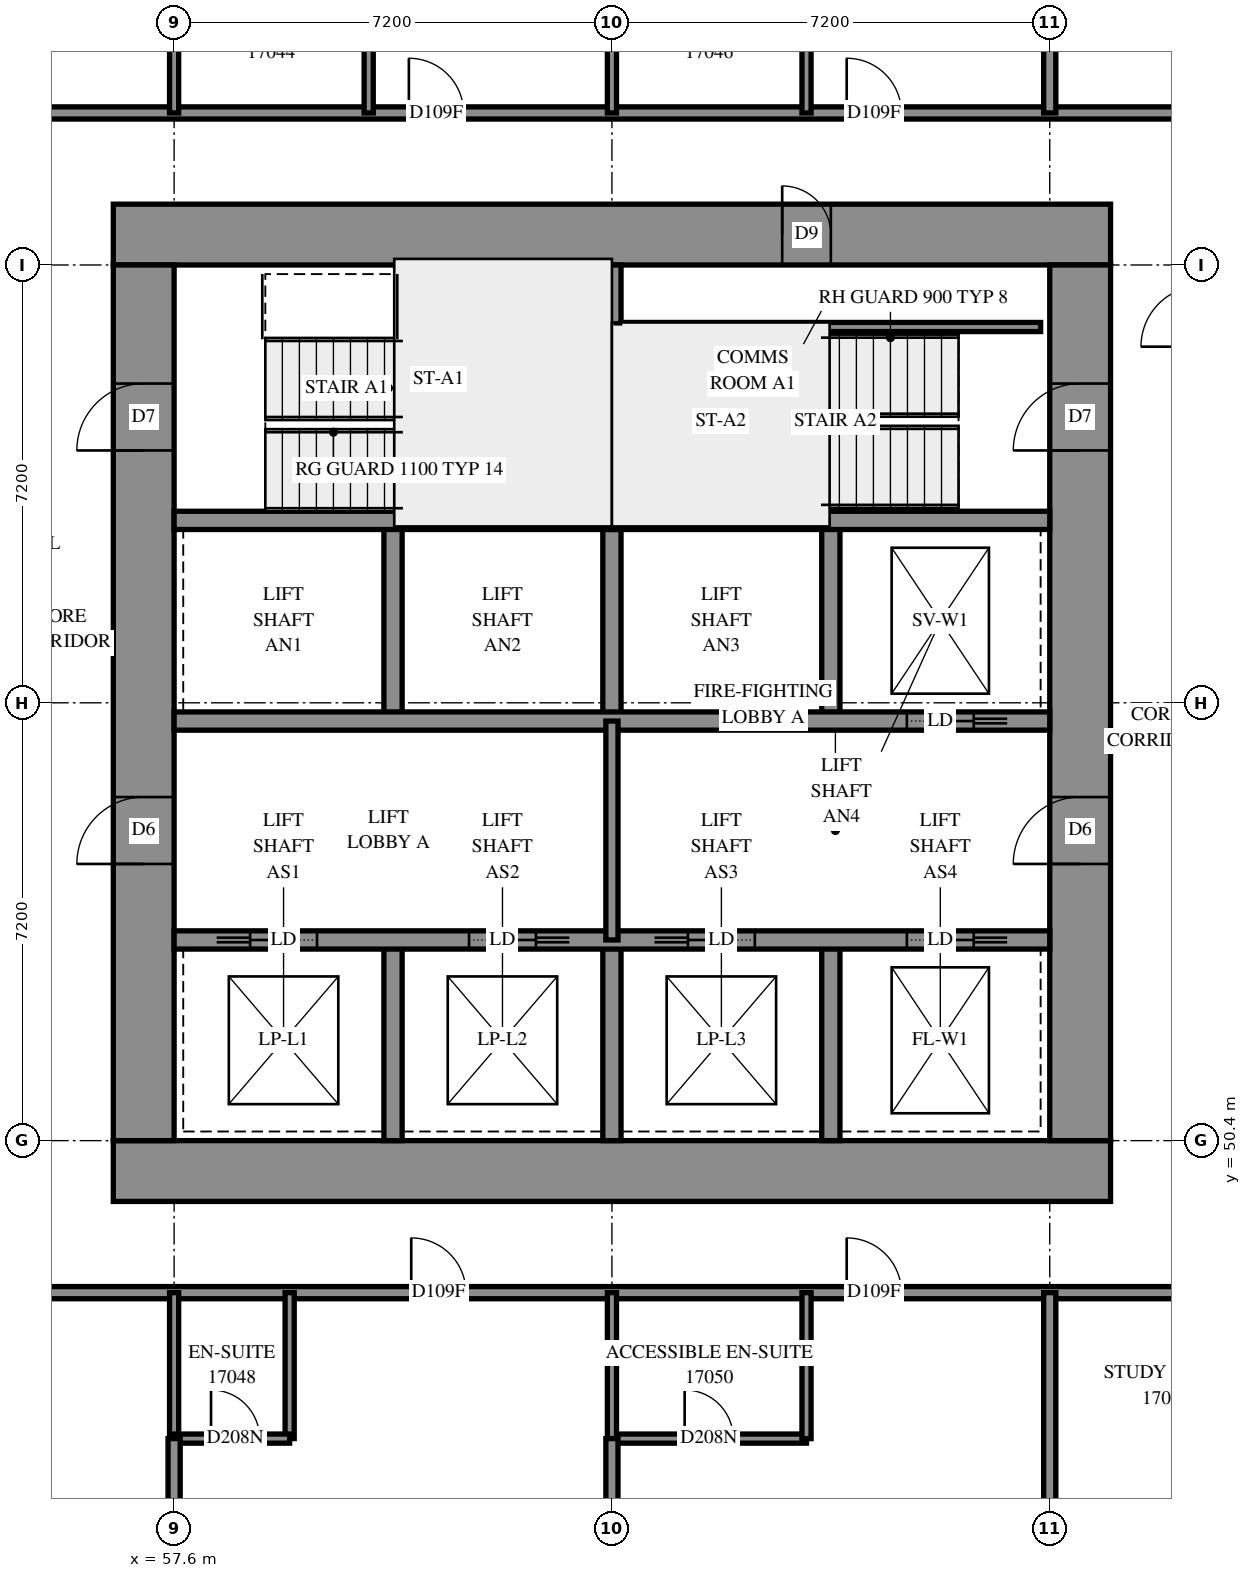
"""IFC4 building model, lengths in metres.
Left out: names, types, materials, properties, quantities, classifications, styles, units other than length and angle.
Written with IfcOpenShell. Run it as: python <this file> out.ifc"""

import sys

from ifc_helpers import new_model, si_unit, direction, frame, frame_2d, origin, place, context, subcontext, project, spatial, rectangle, extrude, element, fill, save


model = new_model("IFC4")
c1 = context("Model", 3, precision=1e-05, world=origin(), true_north=direction((0.0, 1.0)))
c2 = subcontext(c1, "Body", "Model", "MODEL_VIEW")
j1 = project(units=[si_unit("LENGTHUNIT", "METRE"), si_unit("PLANEANGLEUNIT", "RADIAN")], contexts=[c1])
p1 = place(None, origin())
s1 = spatial("IfcSite", under=j1, at=p1, CompositionType="ELEMENT")
p2 = place(p1, origin())
s2 = spatial("IfcBuilding", under=s1, at=p2, CompositionType="ELEMENT")
p3 = place(p2, frame((0.0, 0.0, 64.4)))
s3 = spatial("IfcBuildingStorey", under=s2, at=p3, CompositionType="ELEMENT", Elevation=64.4)
p4 = place(p3, frame((56.6, 49.9, -0.3), z_axis=(0.0, 0.0, 1.0), x_axis=(1.0, 0.0, 0.0)))
e1 = element("IfcWall", 1, at=p4, inside=s3, PredefinedType="SHEAR", context=c2, shape_type="SweptSolid", body=[
    extrude(rectangle(XDim=16.4, YDim=1.0, at=frame_2d((8.2, 0.0))), origin(), (0.0, 0.0, 1.0), 2.7),
])
p5 = place(p3, frame((56.6, 65.3, -0.3), z_axis=(0.0, 0.0, 1.0), x_axis=(1.0, 0.0, 0.0)))
e2 = element("IfcWall", 2, at=p5, inside=s3, PredefinedType="SHEAR", context=c2, shape_type="SweptSolid", body=[
    extrude(rectangle(XDim=16.4, YDim=1.0, at=frame_2d((8.2, 0.0))), origin(), (0.0, 0.0, 1.0), 2.7),
])
p6 = place(p5, frame((11.0, 0.0, 0.3)))
e3 = element("IfcOpeningElement", 3, at=p6, cuts=e2, PredefinedType="OPENING", context=c2, shape_type="SweptSolid", body=[
    extrude(rectangle(XDim=0.8, YDim=2.1, at=frame_2d((0.4, 1.05))), frame((0.0, 0.51, 0.0), z_axis=(0.0, -1.0, 0.0), x_axis=(1.0, 0.0, 0.0)), (0.0, 0.0, 1.0), 1.02),
])
p7 = place(p3, frame((57.1, 50.4, -0.3), z_axis=(0.0, 0.0, 1.0), x_axis=(0.0, 1.0, 0.0)))
e4 = element("IfcWall", 4, at=p7, inside=s3, PredefinedType="SHEAR", context=c2, shape_type="SweptSolid", body=[
    extrude(rectangle(XDim=14.4, YDim=1.0, at=frame_2d((7.2, 0.0))), origin(), (0.0, 0.0, 1.0), 2.7),
])
p8 = place(p7, frame((4.55, 0.0, 0.3)))
e5 = element("IfcOpeningElement", 5, at=p8, cuts=e4, PredefinedType="OPENING", context=c2, shape_type="SweptSolid", body=[
    extrude(rectangle(XDim=1.1, YDim=2.1, at=frame_2d((0.55, 1.05))), frame((0.0, 0.51, 0.0), z_axis=(0.0, -1.0, 0.0), x_axis=(1.0, 0.0, 0.0)), (0.0, 0.0, 1.0), 1.02),
])
p9 = place(p7, frame((11.35, 0.0, 0.3)))
e6 = element("IfcOpeningElement", 6, at=p9, cuts=e4, PredefinedType="OPENING", context=c2, shape_type="SweptSolid", body=[
    extrude(rectangle(XDim=1.1, YDim=2.1, at=frame_2d((0.55, 1.05))), frame((0.0, 0.51, 0.0), z_axis=(0.0, -1.0, 0.0), x_axis=(1.0, 0.0, 0.0)), (0.0, 0.0, 1.0), 1.02),
])
p10 = place(p3, frame((72.5, 50.4, -0.3), z_axis=(0.0, 0.0, 1.0), x_axis=(0.0, 1.0, 0.0)))
e7 = element("IfcWall", 7, at=p10, inside=s3, PredefinedType="SHEAR", context=c2, shape_type="SweptSolid", body=[
    extrude(rectangle(XDim=14.4, YDim=1.0, at=frame_2d((7.2, 0.0))), origin(), (0.0, 0.0, 1.0), 2.7),
])
p11 = place(p10, frame((4.55, 0.0, 0.3)))
e8 = element("IfcOpeningElement", 8, at=p11, cuts=e7, PredefinedType="OPENING", context=c2, shape_type="SweptSolid", body=[
    extrude(rectangle(XDim=1.1, YDim=2.1, at=frame_2d((0.55, 1.05))), frame((0.0, 0.51, 0.0), z_axis=(0.0, -1.0, 0.0), x_axis=(1.0, 0.0, 0.0)), (0.0, 0.0, 1.0), 1.02),
])
p12 = place(p10, frame((11.35, 0.0, 0.3)))
e9 = element("IfcOpeningElement", 9, at=p12, cuts=e7, PredefinedType="OPENING", context=c2, shape_type="SweptSolid", body=[
    extrude(rectangle(XDim=1.1, YDim=2.1, at=frame_2d((0.55, 1.05))), frame((0.0, 0.51, 0.0), z_axis=(0.0, -1.0, 0.0), x_axis=(1.0, 0.0, 0.0)), (0.0, 0.0, 1.0), 1.02),
])
for number, where, z_axis, x_axis in (
    (10, (61.2, 50.4, 0.0), (0.0, 0.0, 1.0), (0.0, 1.0, 0.0)),
    (11, (61.2, 57.3, 0.0), (0.0, 0.0, 1.0), (0.0, 1.0, 0.0)),
    (12, (64.8, 50.4, 0.0), (0.0, 0.0, 1.0), (0.0, 1.0, 0.0)),
    (13, (64.8, 57.3, 0.0), (0.0, 0.0, 1.0), (0.0, 1.0, 0.0)),
    (14, (68.4, 50.4, 0.0), (0.0, 0.0, 1.0), (0.0, 1.0, 0.0)),
    (15, (68.4, 57.3, 0.0), (0.0, 0.0, 1.0), (0.0, 1.0, 0.0)),
):
    element("IfcWall", number, at=place(p3, frame(where, z_axis=z_axis, x_axis=x_axis)), inside=s3, PredefinedType="SOLIDWALL", context=c2, shape_type="SweptSolid", body=[
        extrude(rectangle(XDim=3.3, YDim=0.3, at=frame_2d((1.65, 0.0))), origin(), (0.0, 0.0, 1.0), 3.1),
    ])
p13 = place(p3, frame((57.6, 53.7, 0.0), z_axis=(0.0, 0.0, 1.0), x_axis=(1.0, 0.0, 0.0)))
e16 = element("IfcWall", 16, at=p13, inside=s3, PredefinedType="SOLIDWALL", context=c2, shape_type="SweptSolid", body=[
    extrude(rectangle(XDim=14.4, YDim=0.3, at=frame_2d((7.2, 0.0))), origin(), (0.0, 0.0, 1.0), 3.1),
])
p14 = place(p13, frame((1.25, 0.0, 0.0)))
e17 = element("IfcOpeningElement", 17, at=p14, cuts=e16, PredefinedType="OPENING", context=c2, shape_type="SweptSolid", body=[
    extrude(rectangle(XDim=1.1, YDim=2.1, at=frame_2d((0.55, 1.05))), frame((0.0, 0.16, 0.0), z_axis=(0.0, -1.0, 0.0), x_axis=(1.0, 0.0, 0.0)), (0.0, 0.0, 1.0), 0.32),
])
p15 = place(p13, frame((4.85, 0.0, 0.0)))
e18 = element("IfcOpeningElement", 18, at=p15, cuts=e16, PredefinedType="OPENING", context=c2, shape_type="SweptSolid", body=[
    extrude(rectangle(XDim=1.1, YDim=2.1, at=frame_2d((0.55, 1.05))), frame((0.0, 0.16, 0.0), z_axis=(0.0, -1.0, 0.0), x_axis=(1.0, 0.0, 0.0)), (0.0, 0.0, 1.0), 0.32),
])
p16 = place(p13, frame((8.45, 0.0, 0.0)))
e19 = element("IfcOpeningElement", 19, at=p16, cuts=e16, PredefinedType="OPENING", context=c2, shape_type="SweptSolid", body=[
    extrude(rectangle(XDim=1.1, YDim=2.1, at=frame_2d((0.55, 1.05))), frame((0.0, 0.16, 0.0), z_axis=(0.0, -1.0, 0.0), x_axis=(1.0, 0.0, 0.0)), (0.0, 0.0, 1.0), 0.32),
])
p17 = place(p13, frame((12.05, 0.0, 0.0)))
e20 = element("IfcOpeningElement", 20, at=p17, cuts=e16, PredefinedType="OPENING", context=c2, shape_type="SweptSolid", body=[
    extrude(rectangle(XDim=1.1, YDim=2.1, at=frame_2d((0.55, 1.05))), frame((0.0, 0.16, 0.0), z_axis=(0.0, -1.0, 0.0), x_axis=(1.0, 0.0, 0.0)), (0.0, 0.0, 1.0), 0.32),
])
p18 = place(p3, frame((57.6, 57.3, 0.0), z_axis=(0.0, 0.0, 1.0), x_axis=(1.0, 0.0, 0.0)))
e21 = element("IfcWall", 21, at=p18, inside=s3, PredefinedType="SOLIDWALL", context=c2, shape_type="SweptSolid", body=[
    extrude(rectangle(XDim=14.4, YDim=0.3, at=frame_2d((7.2, 0.0))), origin(), (0.0, 0.0, 1.0), 3.1),
])
p19 = place(p18, frame((12.05, 0.0, 0.0)))
e22 = element("IfcOpeningElement", 22, at=p19, cuts=e21, PredefinedType="OPENING", context=c2, shape_type="SweptSolid", body=[
    extrude(rectangle(XDim=1.1, YDim=2.1, at=frame_2d((0.55, 1.05))), frame((0.0, 0.16, 0.0), z_axis=(0.0, -1.0, 0.0), x_axis=(1.0, 0.0, 0.0)), (0.0, 0.0, 1.0), 0.32),
])
for number, where, z_axis, x_axis in (
    (23, (57.6, 60.6, 0.0), (0.0, 0.0, 1.0), (1.0, 0.0, 0.0)),
    (24, (64.8, 60.6, 0.0), (0.0, 0.0, 1.0), (1.0, 0.0, 0.0)),
):
    element("IfcWall", number, at=place(p3, frame(where, z_axis=z_axis, x_axis=x_axis)), inside=s3, PredefinedType="SOLIDWALL", context=c2, shape_type="SweptSolid", body=[
        extrude(rectangle(XDim=7.2, YDim=0.3, at=frame_2d((3.6, 0.0))), origin(), (0.0, 0.0, 1.0), 3.1),
    ])
p20 = place(p3, frame((64.8, 60.6, 0.0), z_axis=(0.0, 0.0, 1.0), x_axis=(0.0, 1.0, 0.0)))
e25 = element("IfcWall", 25, at=p20, inside=s3, PredefinedType="SOLIDWALL", context=c2, shape_type="SweptSolid", body=[
    extrude(rectangle(XDim=4.2, YDim=0.3, at=frame_2d((2.1, 0.0))), origin(), (0.0, 0.0, 1.0), 3.1),
])
p21 = place(p3, frame((64.95, 63.78, 0.0), z_axis=(0.0, 0.0, 1.0), x_axis=(1.0, 0.0, 0.0)))
e26 = element("IfcWall", 26, at=p21, inside=s3, PredefinedType="PARTITIONING", context=c2, shape_type="SweptSolid", body=[
    extrude(rectangle(XDim=6.9, YDim=0.15, at=frame_2d((3.45, 0.0))), origin(), (0.0, 0.0, 1.0), 3.1),
])
p22 = place(p3, frame((64.8, 53.7, 0.0), z_axis=(0.0, 0.0, 1.0), x_axis=(0.0, 1.0, 0.0)))
e27 = element("IfcWall", 27, at=p22, inside=s3, PredefinedType="PARTITIONING", context=c2, shape_type="SweptSolid", body=[
    extrude(rectangle(XDim=3.6, YDim=0.2, at=frame_2d((1.8, 0.0))), origin(), (0.0, 0.0, 1.0), 3.1),
])
p23 = place(p3, frame((55.1, 67.3, 0.0), z_axis=(0.0, 0.0, 1.0), x_axis=(1.0, 0.0, 0.0)))
e28 = element("IfcWall", 28, at=p23, inside=s3, PredefinedType="PARTITIONING", context=c2, shape_type="SweptSolid", body=[
    extrude(rectangle(XDim=19.4, YDim=0.2, at=frame_2d((9.7, 0.0))), origin(), (0.0, 0.0, 1.0), 3.1),
])
p24 = place(p23, frame((6.361, 0.0, 0.0)))
e29 = element("IfcOpeningElement", 29, at=p24, cuts=e28, PredefinedType="OPENING", context=c2, shape_type="SweptSolid", body=[
    extrude(rectangle(XDim=0.9, YDim=2.1, at=frame_2d((0.45, 1.05))), frame((0.0, 0.11, 0.0), z_axis=(0.0, -1.0, 0.0), x_axis=(1.0, 0.0, 0.0)), (0.0, 0.0, 1.0), 0.22),
])
p25 = place(p23, frame((13.561, 0.0, 0.0)))
e30 = element("IfcOpeningElement", 30, at=p25, cuts=e28, PredefinedType="OPENING", context=c2, shape_type="SweptSolid", body=[
    extrude(rectangle(XDim=0.9, YDim=2.1, at=frame_2d((0.45, 1.05))), frame((0.0, 0.11, 0.0), z_axis=(0.0, -1.0, 0.0), x_axis=(1.0, 0.0, 0.0)), (0.0, 0.0, 1.0), 0.22),
])
p26 = place(p3, frame((55.1, 47.9, 0.0), z_axis=(0.0, 0.0, 1.0), x_axis=(1.0, 0.0, 0.0)))
e31 = element("IfcWall", 31, at=p26, inside=s3, PredefinedType="PARTITIONING", context=c2, shape_type="SweptSolid", body=[
    extrude(rectangle(XDim=19.208, YDim=0.2, at=frame_2d((9.604, 0.0))), origin(), (0.0, 0.0, 1.0), 3.1),
])
p27 = place(p26, frame((6.399, 0.0, 0.0)))
e32 = element("IfcOpeningElement", 32, at=p27, cuts=e31, PredefinedType="OPENING", context=c2, shape_type="SweptSolid", body=[
    extrude(rectangle(XDim=0.9, YDim=2.1, at=frame_2d((0.45, 1.05))), frame((0.0, 0.11, 0.0), z_axis=(0.0, -1.0, 0.0), x_axis=(1.0, 0.0, 0.0)), (0.0, 0.0, 1.0), 0.22),
])
p28 = place(p26, frame((13.561, 0.0, 0.0)))
e33 = element("IfcOpeningElement", 33, at=p28, cuts=e31, PredefinedType="OPENING", context=c2, shape_type="SweptSolid", body=[
    extrude(rectangle(XDim=0.9, YDim=2.1, at=frame_2d((0.45, 1.05))), frame((0.0, 0.11, 0.0), z_axis=(0.0, -1.0, 0.0), x_axis=(1.0, 0.0, 0.0)), (0.0, 0.0, 1.0), 0.22),
])
for number, where, z_axis, x_axis in (
    (34, (72.0, 67.3, 0.0), (0.0, 0.0, 1.0), (0.0, 1.0, 0.0)),
    (35, (72.0, 43.8, 0.0), (0.0, 0.0, 1.0), (0.0, 1.0, 0.0)),
):
    element("IfcWall", number, at=place(p3, frame(where, z_axis=z_axis, x_axis=x_axis)), inside=s3, PredefinedType="PARTITIONING", context=c2, shape_type="SweptSolid", body=[
        extrude(rectangle(XDim=4.1, YDim=0.2, at=frame_2d((2.05, 0.0))), origin(), (0.0, 0.0, 1.0), 3.1),
    ])
p29 = place(p3, frame((64.8, 45.5, 0.0), z_axis=(0.0, 0.0, 1.0), x_axis=(1.0, 0.0, 0.0)))
e36 = element("IfcWall", 36, at=p29, inside=s3, PredefinedType="PARTITIONING", context=c2, shape_type="SweptSolid", body=[
    extrude(rectangle(XDim=3.2, YDim=0.15, at=frame_2d((1.6, 0.0))), origin(), (0.0, 0.0, 1.0), 3.1),
])
p30 = place(p29, frame((1.196, 0.0, 0.0)))
e37 = element("IfcOpeningElement", 37, at=p30, cuts=e36, PredefinedType="OPENING", context=c2, shape_type="SweptSolid", body=[
    extrude(rectangle(XDim=0.8, YDim=2.1, at=frame_2d((0.4, 1.05))), frame((0.0, 0.085, 0.0), z_axis=(0.0, -1.0, 0.0), x_axis=(1.0, 0.0, 0.0)), (0.0, 0.0, 1.0), 0.17),
])
for number, where, z_axis, x_axis in (
    (38, (57.6, 67.3, 0.0), (0.0, 0.0, 1.0), (0.0, 1.0, 0.0)),
    (39, (60.8, 67.3, 0.0), (0.0, 0.0, 1.0), (0.0, 1.0, 0.0)),
    (40, (68.0, 67.3, 0.0), (0.0, 0.0, 1.0), (0.0, 1.0, 0.0)),
    (41, (64.8, 67.3, 0.0), (0.0, 0.0, 1.0), (0.0, 1.0, 0.0)),
    (42, (59.5, 45.5, 0.0), (0.0, 0.0, 1.0), (0.0, 1.0, 0.0)),
    (43, (57.6, 45.5, 0.0), (0.0, 0.0, 1.0), (0.0, 1.0, 0.0)),
    (44, (68.0, 45.5, 0.0), (0.0, 0.0, 1.0), (0.0, 1.0, 0.0)),
    (45, (64.8, 45.5, 0.0), (0.0, 0.0, 1.0), (0.0, 1.0, 0.0)),
):
    element("IfcWall", number, at=place(p3, frame(where, z_axis=z_axis, x_axis=x_axis)), inside=s3, PredefinedType="PARTITIONING", context=c2, shape_type="SweptSolid", body=[
        extrude(rectangle(XDim=2.4, YDim=0.15, at=frame_2d((1.2, 0.0))), origin(), (0.0, 0.0, 1.0), 3.1),
    ])
p31 = place(p3, frame((57.6, 45.5, 0.0), z_axis=(0.0, 0.0, 1.0), x_axis=(1.0, 0.0, 0.0)))
e46 = element("IfcWall", 46, at=p31, inside=s3, PredefinedType="PARTITIONING", context=c2, shape_type="SweptSolid", body=[
    extrude(rectangle(XDim=1.9, YDim=0.15, at=frame_2d((0.95, 0.0))), origin(), (0.0, 0.0, 1.0), 3.1),
])
p32 = place(p31, frame((0.607, 0.0, 0.0)))
e47 = element("IfcOpeningElement", 47, at=p32, cuts=e46, PredefinedType="OPENING", context=c2, shape_type="SweptSolid", body=[
    extrude(rectangle(XDim=0.8, YDim=2.1, at=frame_2d((0.4, 1.05))), frame((0.0, 0.085, 0.0), z_axis=(0.0, -1.0, 0.0), x_axis=(1.0, 0.0, 0.0)), (0.0, 0.0, 1.0), 0.17),
])
for number, where, z_axis, x_axis in (
    (48, (57.6, 43.8, 0.0), (0.0, 0.0, 1.0), (0.0, 1.0, 0.0)),
    (49, (64.8, 43.8, 0.0), (0.0, 0.0, 1.0), (0.0, 1.0, 0.0)),
):
    element("IfcWall", number, at=place(p3, frame(where, z_axis=z_axis, x_axis=x_axis)), inside=s3, PredefinedType="PARTITIONING", context=c2, shape_type="SweptSolid", body=[
        extrude(rectangle(XDim=1.7, YDim=0.2, at=frame_2d((0.85, 0.0))), origin(), (0.0, 0.0, 1.0), 3.1),
    ])
p33 = place(p6, origin())
e50 = element("IfcDoor", 50, at=p33, inside=s3, OperationType="SINGLE_SWING_RIGHT", PredefinedType="DOOR", context=c2, shape_type="SweptSolid", body=[
    extrude(rectangle(XDim=0.8, YDim=2.1, at=frame_2d((0.4, 1.05))), frame((0.0, -0.44, 0.0), z_axis=(0.0, -1.0, 0.0), x_axis=(1.0, 0.0, 0.0)), (0.0, 0.0, 1.0), 0.05),
])
fill(e3, e50)
p34 = place(p8, origin())
e51 = element("IfcDoor", 51, at=p34, inside=s3, OperationType="DOUBLE_DOOR_SINGLE_SWING", PredefinedType="DOOR", context=c2, shape_type="SweptSolid", body=[
    extrude(rectangle(XDim=1.1, YDim=2.1, at=frame_2d((0.55, 1.05))), frame((0.0, 0.025, 0.0), z_axis=(0.0, -1.0, 0.0), x_axis=(1.0, 0.0, 0.0)), (0.0, 0.0, 1.0), 0.05),
])
fill(e5, e51)
p35 = place(p11, origin())
e52 = element("IfcDoor", 52, at=p35, inside=s3, OperationType="DOUBLE_DOOR_SINGLE_SWING", PredefinedType="DOOR", context=c2, shape_type="SweptSolid", body=[
    extrude(rectangle(XDim=1.1, YDim=2.1, at=frame_2d((0.55, 1.05))), frame((0.0, 0.025, 0.0), z_axis=(0.0, -1.0, 0.0), x_axis=(1.0, 0.0, 0.0)), (0.0, 0.0, 1.0), 0.05),
])
fill(e8, e52)
p36 = place(p9, origin())
e53 = element("IfcDoor", 53, at=p36, inside=s3, OperationType="SINGLE_SWING_LEFT", PredefinedType="DOOR", context=c2, shape_type="SweptSolid", body=[
    extrude(rectangle(XDim=1.1, YDim=2.1, at=frame_2d((0.55, 1.05))), frame((0.0, 0.025, 0.0), z_axis=(0.0, -1.0, 0.0), x_axis=(1.0, 0.0, 0.0)), (0.0, 0.0, 1.0), 0.05),
])
fill(e6, e53)
p37 = place(p12, origin())
e54 = element("IfcDoor", 54, at=p37, inside=s3, OperationType="SINGLE_SWING_RIGHT", PredefinedType="DOOR", context=c2, shape_type="SweptSolid", body=[
    extrude(rectangle(XDim=1.1, YDim=2.1, at=frame_2d((0.55, 1.05))), frame((0.0, 0.025, 0.0), z_axis=(0.0, -1.0, 0.0), x_axis=(1.0, 0.0, 0.0)), (0.0, 0.0, 1.0), 0.05),
])
fill(e9, e54)
p38 = place(p14, origin())
e55 = element("IfcDoor", 55, at=p38, inside=s3, OperationType="SLIDING_TO_LEFT", PredefinedType="DOOR", context=c2, shape_type="SweptSolid", body=[
    extrude(rectangle(XDim=1.1, YDim=2.1, at=frame_2d((0.55, 1.05))), frame((0.0, 0.025, 0.0), z_axis=(0.0, -1.0, 0.0), x_axis=(1.0, 0.0, 0.0)), (0.0, 0.0, 1.0), 0.05),
])
fill(e17, e55)
p39 = place(p15, origin())
e56 = element("IfcDoor", 56, at=p39, inside=s3, OperationType="SLIDING_TO_RIGHT", PredefinedType="DOOR", context=c2, shape_type="SweptSolid", body=[
    extrude(rectangle(XDim=1.1, YDim=2.1, at=frame_2d((0.55, 1.05))), frame((0.0, 0.025, 0.0), z_axis=(0.0, -1.0, 0.0), x_axis=(1.0, 0.0, 0.0)), (0.0, 0.0, 1.0), 0.05),
])
fill(e18, e56)
p40 = place(p16, origin())
e57 = element("IfcDoor", 57, at=p40, inside=s3, OperationType="SLIDING_TO_LEFT", PredefinedType="DOOR", context=c2, shape_type="SweptSolid", body=[
    extrude(rectangle(XDim=1.1, YDim=2.1, at=frame_2d((0.55, 1.05))), frame((0.0, 0.025, 0.0), z_axis=(0.0, -1.0, 0.0), x_axis=(1.0, 0.0, 0.0)), (0.0, 0.0, 1.0), 0.05),
])
fill(e19, e57)
p41 = place(p17, origin())
e58 = element("IfcDoor", 58, at=p41, inside=s3, OperationType="SLIDING_TO_RIGHT", PredefinedType="DOOR", context=c2, shape_type="SweptSolid", body=[
    extrude(rectangle(XDim=1.1, YDim=2.1, at=frame_2d((0.55, 1.05))), frame((0.0, 0.025, 0.0), z_axis=(0.0, -1.0, 0.0), x_axis=(1.0, 0.0, 0.0)), (0.0, 0.0, 1.0), 0.05),
])
fill(e20, e58)
p42 = place(p19, origin())
e59 = element("IfcDoor", 59, at=p42, inside=s3, OperationType="SLIDING_TO_RIGHT", PredefinedType="DOOR", context=c2, shape_type="SweptSolid", body=[
    extrude(rectangle(XDim=1.1, YDim=2.1, at=frame_2d((0.55, 1.05))), frame((0.0, 0.025, 0.0), z_axis=(0.0, -1.0, 0.0), x_axis=(1.0, 0.0, 0.0)), (0.0, 0.0, 1.0), 0.05),
])
fill(e22, e59)
p43 = place(p24, origin())
e60 = element("IfcDoor", 60, at=p43, inside=s3, OperationType="SINGLE_SWING_RIGHT", PredefinedType="DOOR", context=c2, shape_type="SweptSolid", body=[
    extrude(rectangle(XDim=0.9, YDim=2.1, at=frame_2d((0.45, 1.05))), frame((0.0, 0.025, 0.0), z_axis=(0.0, -1.0, 0.0), x_axis=(1.0, 0.0, 0.0)), (0.0, 0.0, 1.0), 0.05),
])
fill(e29, e60)
p44 = place(p25, origin())
e61 = element("IfcDoor", 61, at=p44, inside=s3, OperationType="SINGLE_SWING_RIGHT", PredefinedType="DOOR", context=c2, shape_type="SweptSolid", body=[
    extrude(rectangle(XDim=0.9, YDim=2.1, at=frame_2d((0.45, 1.05))), frame((0.0, 0.025, 0.0), z_axis=(0.0, -1.0, 0.0), x_axis=(1.0, 0.0, 0.0)), (0.0, 0.0, 1.0), 0.05),
])
fill(e30, e61)
p45 = place(p27, origin())
e62 = element("IfcDoor", 62, at=p45, inside=s3, OperationType="SINGLE_SWING_LEFT", PredefinedType="DOOR", context=c2, shape_type="SweptSolid", body=[
    extrude(rectangle(XDim=0.9, YDim=2.1, at=frame_2d((0.45, 1.05))), frame((0.0, 0.025, 0.0), z_axis=(0.0, -1.0, 0.0), x_axis=(1.0, 0.0, 0.0)), (0.0, 0.0, 1.0), 0.05),
])
fill(e32, e62)
p46 = place(p32, origin())
e63 = element("IfcDoor", 63, at=p46, inside=s3, OperationType="SINGLE_SWING_RIGHT", PredefinedType="DOOR", context=c2, shape_type="SweptSolid", body=[
    extrude(rectangle(XDim=0.8, YDim=2.1, at=frame_2d((0.4, 1.05))), frame((0.0, 0.025, 0.0), z_axis=(0.0, -1.0, 0.0), x_axis=(1.0, 0.0, 0.0)), (0.0, 0.0, 1.0), 0.05),
])
fill(e47, e63)
p47 = place(p28, origin())
e64 = element("IfcDoor", 64, at=p47, inside=s3, OperationType="SINGLE_SWING_LEFT", PredefinedType="DOOR", context=c2, shape_type="SweptSolid", body=[
    extrude(rectangle(XDim=0.9, YDim=2.1, at=frame_2d((0.45, 1.05))), frame((0.0, 0.025, 0.0), z_axis=(0.0, -1.0, 0.0), x_axis=(1.0, 0.0, 0.0)), (0.0, 0.0, 1.0), 0.05),
])
fill(e33, e64)
p48 = place(p30, origin())
e65 = element("IfcDoor", 65, at=p48, inside=s3, OperationType="SINGLE_SWING_RIGHT", PredefinedType="DOOR", context=c2, shape_type="SweptSolid", body=[
    extrude(rectangle(XDim=0.8, YDim=2.1, at=frame_2d((0.4, 1.05))), frame((0.0, 0.025, 0.0), z_axis=(0.0, -1.0, 0.0), x_axis=(1.0, 0.0, 0.0)), (0.0, 0.0, 1.0), 0.05),
])
fill(e37, e65)
save(model, sys.argv[1])
